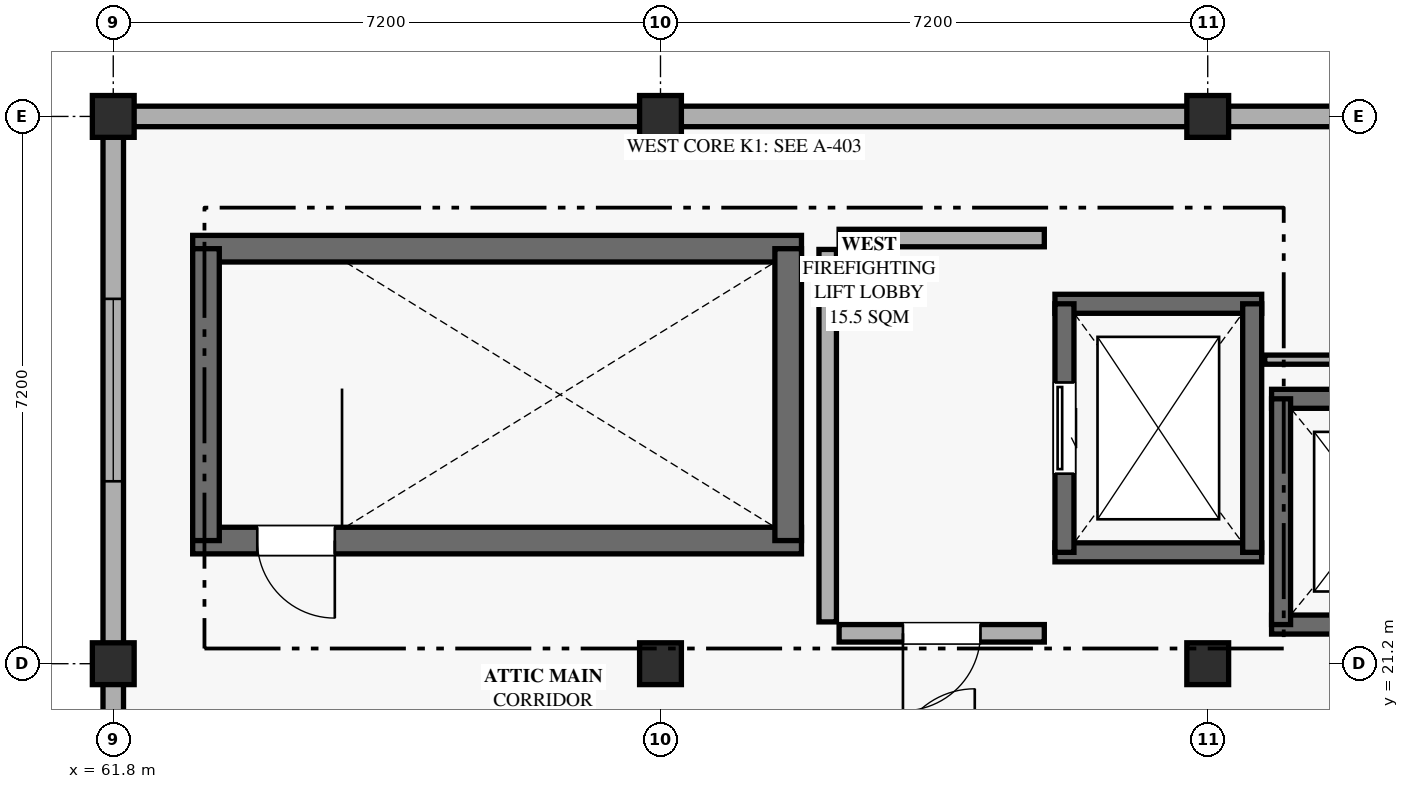
"""IFC4 building model, lengths in metres.
Left out: names, types, materials, properties, quantities, classifications, styles, units other than length and angle.
Written with IfcOpenShell. Run it as: python <this file> out.ifc"""

import sys

from ifc_helpers import new_model, si_unit, direction, frame, frame_2d, origin, origin_2d, place, context, subcontext, project, spatial, rectangle, extrude, element, fill, save


model = new_model("IFC4")
c1 = context("Model", 3, precision=1e-05, world=origin(), true_north=direction((0.0, 1.0)))
c2 = subcontext(c1, "Body", "Model", "MODEL_VIEW")
j1 = project(units=[si_unit("LENGTHUNIT", "METRE"), si_unit("PLANEANGLEUNIT", "RADIAN")], contexts=[c1])
p1 = place(None, origin())
s1 = spatial("IfcSite", under=j1, at=p1, CompositionType="ELEMENT")
p2 = place(p1, origin())
s2 = spatial("IfcBuilding", under=s1, at=p2, CompositionType="ELEMENT")
p3 = place(p2, frame((0.0, 0.0, 41.94)))
s3 = spatial("IfcBuildingStorey", under=s2, at=p3, CompositionType="ELEMENT", Elevation=41.94)
for number, where, z_axis, x_axis in (
    (1, (61.8, 21.2, 0.0), (0.0, 0.0, 1.0), (1.0, 0.0, 0.0)),
    (2, (69.0, 21.2, 0.0), (0.0, 0.0, 1.0), (1.0, 0.0, 0.0)),
    (3, (76.2, 21.2, 0.0), (0.0, 0.0, 1.0), (1.0, 0.0, 0.0)),
    (4, (61.8, 28.4, 0.0), (0.0, 0.0, 1.0), (1.0, 0.0, 0.0)),
    (5, (69.0, 28.4, 0.0), (0.0, 0.0, 1.0), (1.0, 0.0, 0.0)),
    (6, (76.2, 28.4, 0.0), (0.0, 0.0, 1.0), (1.0, 0.0, 0.0)),
):
    element("IfcColumn", number, at=place(p3, frame(where, z_axis=z_axis, x_axis=x_axis)), inside=s3, PredefinedType="COLUMN", context=c2, shape_type="SweptSolid", body=[
        extrude(rectangle(XDim=0.55, YDim=0.55, at=origin_2d()), origin(), (0.0, 0.0, 1.0), 4.32),
    ])
for number, where, z_axis, x_axis in (
    (7, (62.06, 28.4, 0.0), (0.0, 0.0, 1.0), (1.0, 0.0, 0.0)),
    (8, (69.26, 28.4, 0.0), (0.0, 0.0, 1.0), (1.0, 0.0, 0.0)),
    (9, (76.46, 28.4, 0.0), (0.0, 0.0, 1.0), (1.0, 0.0, 0.0)),
):
    element("IfcWall", number, at=place(p3, frame(where, z_axis=z_axis, x_axis=x_axis)), inside=s3, PredefinedType="SOLIDWALL", context=c2, shape_type="SweptSolid", body=[
        extrude(rectangle(XDim=6.68, YDim=0.27, at=frame_2d((3.34, 0.0))), origin(), (0.0, 0.0, 1.0), 2.82),
    ])
p4 = place(p3, frame((61.8, 14.26, 0.0), z_axis=(0.0, 0.0, 1.0), x_axis=(0.0, 1.0, 0.0)))
e10 = element("IfcWall", 10, at=p4, inside=s3, PredefinedType="SOLIDWALL", context=c2, shape_type="SweptSolid", body=[
    extrude(rectangle(XDim=6.68, YDim=0.27, at=frame_2d((3.34, 0.0))), origin(), (0.0, 0.0, 1.0), 2.82),
])
p5 = place(p4, frame((2.14, 0.0, 0.85)))
e11 = element("IfcOpeningElement", 11, at=p5, cuts=e10, PredefinedType="OPENING", context=c2, shape_type="SweptSolid", body=[
    extrude(rectangle(XDim=2.4, YDim=1.8, at=frame_2d((1.2, 0.9))), frame((0.0, 0.145, 0.0), z_axis=(0.0, -1.0, 0.0), x_axis=(1.0, 0.0, 0.0)), (0.0, 0.0, 1.0), 0.29),
])
p6 = place(p3, frame((61.8, 21.46, 0.0), z_axis=(0.0, 0.0, 1.0), x_axis=(0.0, 1.0, 0.0)))
e12 = element("IfcWall", 12, at=p6, inside=s3, PredefinedType="SOLIDWALL", context=c2, shape_type="SweptSolid", body=[
    extrude(rectangle(XDim=6.68, YDim=0.27, at=frame_2d((3.34, 0.0))), origin(), (0.0, 0.0, 1.0), 2.82),
])
p7 = place(p6, frame((2.14, 0.0, 0.85)))
e13 = element("IfcOpeningElement", 13, at=p7, cuts=e12, PredefinedType="OPENING", context=c2, shape_type="SweptSolid", body=[
    extrude(rectangle(XDim=2.4, YDim=1.8, at=frame_2d((1.2, 0.9))), frame((0.0, 0.145, 0.0), z_axis=(0.0, -1.0, 0.0), x_axis=(1.0, 0.0, 0.0)), (0.0, 0.0, 1.0), 0.29),
])
p8 = place(p3, frame((70.855, 22.82, 0.0), z_axis=(0.0, 0.0, 1.0), x_axis=(-1.0, 0.0, 0.0)))
e14 = element("IfcWall", 14, at=p8, inside=s3, PredefinedType="SHEAR", context=c2, shape_type="SweptSolid", body=[
    extrude(rectangle(XDim=8.01, YDim=0.35, at=frame_2d((4.005, 0.0))), origin(), (0.0, 0.0, 1.0), 4.07),
])
p9 = place(p8, frame((6.14, 0.0, 0.0)))
e15 = element("IfcOpeningElement", 15, at=p9, cuts=e14, PredefinedType="OPENING", context=c2, shape_type="SweptSolid", body=[
    extrude(rectangle(XDim=1.02, YDim=2.18, at=frame_2d((0.51, 1.09))), frame((0.0, 0.185, 0.0), z_axis=(0.0, -1.0, 0.0), x_axis=(1.0, 0.0, 0.0)), (0.0, 0.0, 1.0), 0.37),
])
p10 = place(p3, frame((62.845, 26.66, 0.0), z_axis=(0.0, 0.0, 1.0), x_axis=(1.0, 0.0, 0.0)))
e16 = element("IfcWall", 16, at=p10, inside=s3, PredefinedType="SHEAR", context=c2, shape_type="SweptSolid", body=[
    extrude(rectangle(XDim=8.01, YDim=0.35, at=frame_2d((4.005, 0.0))), origin(), (0.0, 0.0, 1.0), 4.07),
])
for number, where, z_axis, x_axis in (
    (17, (63.02, 22.82, 0.0), (0.0, 0.0, 1.0), (0.0, 1.0, 0.0)),
    (18, (70.68, 26.66, 0.0), (0.0, 0.0, 1.0), (0.0, -1.0, 0.0)),
):
    element("IfcWall", number, at=place(p3, frame(where, z_axis=z_axis, x_axis=x_axis)), inside=s3, PredefinedType="SHEAR", context=c2, shape_type="SweptSolid", body=[
        extrude(rectangle(XDim=3.84, YDim=0.35, at=frame_2d((1.92, 0.0))), origin(), (0.0, 0.0, 1.0), 4.07),
    ])
for number, where, z_axis, x_axis in (
    (19, (76.91, 22.665, 0.0), (0.0, 0.0, 1.0), (-1.0, 0.0, 0.0)),
    (20, (74.19, 25.935, 0.0), (0.0, 0.0, 1.0), (1.0, 0.0, 0.0)),
):
    element("IfcWall", number, at=place(p3, frame(where, z_axis=z_axis, x_axis=x_axis)), inside=s3, PredefinedType="SHEAR", context=c2, shape_type="SweptSolid", body=[
        extrude(rectangle(XDim=2.72, YDim=0.25, at=frame_2d((1.36, 0.0))), origin(), (0.0, 0.0, 1.0), 4.07),
    ])
p11 = place(p3, frame((74.315, 22.665, 0.0), z_axis=(0.0, 0.0, 1.0), x_axis=(0.0, 1.0, 0.0)))
e21 = element("IfcWall", 21, at=p11, inside=s3, PredefinedType="SHEAR", context=c2, shape_type="SweptSolid", body=[
    extrude(rectangle(XDim=3.27, YDim=0.25, at=frame_2d((1.635, 0.0))), origin(), (0.0, 0.0, 1.0), 4.07),
])
p12 = place(p11, frame((1.035, 0.0, 0.0)))
e22 = element("IfcOpeningElement", 22, at=p12, cuts=e21, PredefinedType="OPENING", context=c2, shape_type="SweptSolid", body=[
    extrude(rectangle(XDim=1.2, YDim=2.25, at=frame_2d((0.6, 1.125))), frame((0.0, 0.135, 0.0), z_axis=(0.0, -1.0, 0.0), x_axis=(1.0, 0.0, 0.0)), (0.0, 0.0, 1.0), 0.27),
])
p13 = place(p3, frame((76.785, 25.935, 0.0), z_axis=(0.0, 0.0, 1.0), x_axis=(0.0, -1.0, 0.0)))
e23 = element("IfcWall", 23, at=p13, inside=s3, PredefinedType="SHEAR", context=c2, shape_type="SweptSolid", body=[
    extrude(rectangle(XDim=3.27, YDim=0.25, at=frame_2d((1.635, 0.0))), origin(), (0.0, 0.0, 1.0), 4.07),
])
p14 = place(p3, frame((79.76, 21.715, 0.0), z_axis=(0.0, 0.0, 1.0), x_axis=(-1.0, 0.0, 0.0)))
e24 = element("IfcWall", 24, at=p14, inside=s3, PredefinedType="SHEAR", context=c2, shape_type="SweptSolid", body=[
    extrude(rectangle(XDim=2.72, YDim=0.25, at=frame_2d((1.36, 0.0))), origin(), (0.0, 0.0, 1.0), 4.07),
])
p15 = place(p14, frame((0.81, 0.0, 0.0)))
e25 = element("IfcOpeningElement", 25, at=p15, cuts=e24, PredefinedType="OPENING", context=c2, shape_type="SweptSolid", body=[
    extrude(rectangle(XDim=1.1, YDim=2.2, at=frame_2d((0.55, 1.1))), frame((0.0, 0.135, 0.0), z_axis=(0.0, -1.0, 0.0), x_axis=(1.0, 0.0, 0.0)), (0.0, 0.0, 1.0), 0.27),
])
p16 = place(p3, frame((77.04, 24.685, 0.0), z_axis=(0.0, 0.0, 1.0), x_axis=(1.0, 0.0, 0.0)))
e26 = element("IfcWall", 26, at=p16, inside=s3, PredefinedType="SHEAR", context=c2, shape_type="SweptSolid", body=[
    extrude(rectangle(XDim=2.72, YDim=0.25, at=frame_2d((1.36, 0.0))), origin(), (0.0, 0.0, 1.0), 4.07),
])
p17 = place(p3, frame((77.165, 21.715, 0.0), z_axis=(0.0, 0.0, 1.0), x_axis=(0.0, 1.0, 0.0)))
e27 = element("IfcWall", 27, at=p17, inside=s3, PredefinedType="SHEAR", context=c2, shape_type="SweptSolid", body=[
    extrude(rectangle(XDim=2.97, YDim=0.25, at=frame_2d((1.485, 0.0))), origin(), (0.0, 0.0, 1.0), 4.07),
])
p18 = place(p3, frame((74.05, 21.6, 0.0), z_axis=(0.0, 0.0, 1.0), x_axis=(-1.0, 0.0, 0.0)))
e28 = element("IfcWall", 28, at=p18, inside=s3, PredefinedType="PARTITIONING", context=c2, shape_type="SweptSolid", body=[
    extrude(rectangle(XDim=2.7, YDim=0.23, at=frame_2d((1.35, 0.0))), origin(), (0.0, 0.0, 1.0), 2.8),
])
p19 = place(p18, frame((0.84, 0.0, 0.0)))
e29 = element("IfcOpeningElement", 29, at=p19, cuts=e28, PredefinedType="OPENING", context=c2, shape_type="SweptSolid", body=[
    extrude(rectangle(XDim=1.02, YDim=2.06, at=frame_2d((0.51, 1.03))), frame((0.0, 0.125, 0.0), z_axis=(0.0, -1.0, 0.0), x_axis=(1.0, 0.0, 0.0)), (0.0, 0.0, 1.0), 0.25),
])
p20 = place(p3, frame((71.35, 26.8, 0.0), z_axis=(0.0, 0.0, 1.0), x_axis=(1.0, 0.0, 0.0)))
e30 = element("IfcWall", 30, at=p20, inside=s3, PredefinedType="PARTITIONING", context=c2, shape_type="SweptSolid", body=[
    extrude(rectangle(XDim=2.7, YDim=0.23, at=frame_2d((1.35, 0.0))), origin(), (0.0, 0.0, 1.0), 2.8),
])
p21 = place(p3, frame((71.2, 21.75, 0.0), z_axis=(0.0, 0.0, 1.0), x_axis=(0.0, 1.0, 0.0)))
e31 = element("IfcWall", 31, at=p21, inside=s3, PredefinedType="PARTITIONING", context=c2, shape_type="SweptSolid", body=[
    extrude(rectangle(XDim=4.9, YDim=0.23, at=frame_2d((2.45, 0.0))), origin(), (0.0, 0.0, 1.0), 2.8),
])
p22 = place(p3, frame((82.65, 25.2, 0.0), z_axis=(0.0, 0.0, 1.0), x_axis=(-1.0, 0.0, 0.0)))
e32 = element("IfcWall", 32, at=p22, inside=s3, PredefinedType="PARTITIONING", context=c2, shape_type="SweptSolid", body=[
    extrude(rectangle(XDim=5.7, YDim=0.12, at=frame_2d((2.85, 0.0))), origin(), (0.0, 0.0, 1.0), 2.8),
])
p23 = place(p7, origin())
e33 = element("IfcWindow", 33, at=p23, inside=s3, PartitioningType="DOUBLE_PANEL_VERTICAL", PredefinedType="WINDOW", context=c2, shape_type="SweptSolid", body=[
    extrude(rectangle(XDim=2.4, YDim=1.8, at=frame_2d((1.2, 0.9))), frame((0.0, 0.03, 0.0), z_axis=(0.0, -1.0, 0.0), x_axis=(1.0, 0.0, 0.0)), (0.0, 0.0, 1.0), 0.06),
])
fill(e13, e33)
p24 = place(p9, origin())
e34 = element("IfcDoor", 34, at=p24, inside=s3, OperationType="SINGLE_SWING_LEFT", PredefinedType="DOOR", context=c2, shape_type="SweptSolid", body=[
    extrude(rectangle(XDim=1.02, YDim=2.18, at=frame_2d((0.51, 1.09))), frame((0.0, 0.025, 0.0), z_axis=(0.0, -1.0, 0.0), x_axis=(1.0, 0.0, 0.0)), (0.0, 0.0, 1.0), 0.05),
])
fill(e15, e34)
p25 = place(p12, origin())
e35 = element("IfcDoor", 35, at=p25, inside=s3, OperationType="SLIDING_TO_LEFT", PredefinedType="DOOR", context=c2, shape_type="SweptSolid", body=[
    extrude(rectangle(XDim=1.2, YDim=2.25, at=frame_2d((0.6, 1.125))), frame((0.0, 0.025, 0.0), z_axis=(0.0, -1.0, 0.0), x_axis=(1.0, 0.0, 0.0)), (0.0, 0.0, 1.0), 0.05),
])
fill(e22, e35)
p26 = place(p19, origin())
e36 = element("IfcDoor", 36, at=p26, inside=s3, OperationType="SINGLE_SWING_RIGHT", PredefinedType="DOOR", context=c2, shape_type="SweptSolid", body=[
    extrude(rectangle(XDim=1.02, YDim=2.06, at=frame_2d((0.51, 1.03))), frame((0.0, 0.025, 0.0), z_axis=(0.0, -1.0, 0.0), x_axis=(1.0, 0.0, 0.0)), (0.0, 0.0, 1.0), 0.05),
])
fill(e29, e36)
save(model, sys.argv[1])
